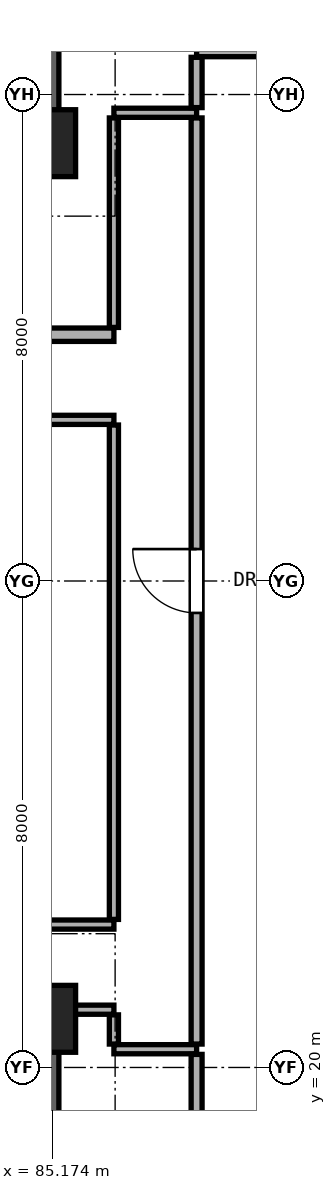
"""IFC4 building model, lengths in metres.
Left out: names, types, materials, properties, quantities, classifications, styles, units other than length and angle.
Written with IfcOpenShell. Run it as: python <this file> out.ifc"""

import sys

from ifc_helpers import new_model, si_unit, direction, frame, frame_2d, origin, origin_2d, place, context, subcontext, project, spatial, rectangle, extrude, element, fill, save


model = new_model("IFC4")
c1 = context("Model", 3, precision=1e-05, world=origin(), true_north=direction((0.0, 1.0)))
c2 = subcontext(c1, "Body", "Model", "MODEL_VIEW")
j1 = project(units=[si_unit("LENGTHUNIT", "METRE"), si_unit("PLANEANGLEUNIT", "RADIAN")], contexts=[c1])
p1 = place(None, origin())
s1 = spatial("IfcSite", under=j1, at=p1, CompositionType="ELEMENT")
p2 = place(p1, origin())
s2 = spatial("IfcBuilding", under=s1, at=p2, CompositionType="ELEMENT")
p3 = place(p2, frame((0.0, 0.0, 137.9)))
s3 = spatial("IfcBuildingStorey", under=s2, at=p3, CompositionType="ELEMENT", Elevation=137.9)
for number, where, z_axis, x_axis in (
    (1, (85.0, 20.8, 0.0), (0.0, 0.0, 1.0), (1.0, 0.0, 0.0)),
    (2, (85.0, 35.2, 0.0), (0.0, 0.0, 1.0), (1.0, 0.0, 0.0)),
):
    element("IfcColumn", number, at=place(p3, frame(where, z_axis=z_axis, x_axis=x_axis)), inside=s3, PredefinedType="COLUMN", context=c2, shape_type="SweptSolid", body=[
        extrude(rectangle(XDim=1.1, YDim=1.1, at=origin_2d()), origin(), (0.0, 0.0, 1.0), 3.3),
    ])
for number, where, z_axis, x_axis in (
    (3, (85.0, 35.2, 0.0), (0.0, 0.0, 1.0), (0.0, 1.0, 0.0)),
    (4, (85.0, 15.2, 0.0), (0.0, 0.0, 1.0), (0.0, 1.0, 0.0)),
):
    element("IfcWall", number, at=place(p3, frame(where, z_axis=z_axis, x_axis=x_axis)), inside=s3, PredefinedType="SHEAR", context=c2, shape_type="SweptSolid", body=[
        extrude(rectangle(XDim=5.6, YDim=0.55, at=frame_2d((2.8, 0.0))), origin(), (0.0, 0.0, 1.0), 3.08),
    ])
p4 = place(p3, frame((86.18, 20.3, 0.0), z_axis=(0.0, 0.0, 1.0), x_axis=(1.0, 0.0, 0.0)))
e5 = element("IfcWall", 5, at=p4, inside=s3, PredefinedType="PARTITIONING", context=c2, shape_type="SweptSolid", body=[
    extrude(rectangle(XDim=1.36, YDim=0.15, at=frame_2d((0.68, 0.0))), origin(), (0.0, 0.0, 1.0), 3.08),
])
p5 = place(p3, frame((85.27, 20.95, 0.0), z_axis=(0.0, 0.0, 1.0), x_axis=(1.0, 0.0, 0.0)))
e6 = element("IfcWall", 6, at=p5, inside=s3, PredefinedType="PARTITIONING", context=c2, shape_type="SweptSolid", body=[
    extrude(rectangle(XDim=0.91, YDim=0.15, at=frame_2d((0.455, 0.0))), origin(), (0.0, 0.0, 1.0), 2.472),
])
p6 = place(p3, frame((66.68, 22.35, 0.0), z_axis=(0.0, 0.0, 1.0), x_axis=(1.0, 0.0, 0.0)))
e7 = element("IfcWall", 7, at=p6, inside=s3, PredefinedType="PARTITIONING", context=c2, shape_type="SweptSolid", body=[
    extrude(rectangle(XDim=19.5, YDim=0.15, at=frame_2d((9.75, 0.0))), origin(), (0.0, 0.0, 1.0), 2.216),
])
p7 = place(p6, frame((7.954, 0.0, 0.0)))
e8 = element("IfcOpeningElement", 8, at=p7, cuts=e7, PredefinedType="OPENING", context=c2, shape_type="SweptSolid", body=[
    extrude(rectangle(XDim=1.05, YDim=2.2, at=frame_2d((0.525, 1.1))), frame((0.0, 0.085, 0.0), z_axis=(0.0, -1.0, 0.0), x_axis=(1.0, 0.0, 0.0)), (0.0, 0.0, 1.0), 0.17),
])
p8 = place(p3, frame((66.68, 30.65, 0.0), z_axis=(0.0, 0.0, 1.0), x_axis=(1.0, 0.0, 0.0)))
e9 = element("IfcWall", 9, at=p8, inside=s3, PredefinedType="PARTITIONING", context=c2, shape_type="SweptSolid", body=[
    extrude(rectangle(XDim=19.5, YDim=0.15, at=frame_2d((9.75, 0.0))), origin(), (0.0, 0.0, 1.0), 2.216),
])
p9 = place(p8, frame((3.745, 0.0, 0.0)))
e10 = element("IfcOpeningElement", 10, at=p9, cuts=e9, PredefinedType="OPENING", context=c2, shape_type="SweptSolid", body=[
    extrude(rectangle(XDim=0.95, YDim=2.15, at=frame_2d((0.475, 1.075))), frame((0.0, 0.085, 0.0), z_axis=(0.0, -1.0, 0.0), x_axis=(1.0, 0.0, 0.0)), (0.0, 0.0, 1.0), 0.17),
])
p10 = place(p8, frame((14.999, 0.0, 0.0)))
e11 = element("IfcOpeningElement", 11, at=p10, cuts=e9, PredefinedType="OPENING", context=c2, shape_type="SweptSolid", body=[
    extrude(rectangle(XDim=1.05, YDim=2.2, at=frame_2d((0.525, 1.1))), frame((0.0, 0.085, 0.0), z_axis=(0.0, -1.0, 0.0), x_axis=(1.0, 0.0, 0.0)), (0.0, 0.0, 1.0), 0.17),
])
p11 = place(p3, frame((71.55, 32.05, 0.0), z_axis=(0.0, 0.0, 1.0), x_axis=(1.0, 0.0, 0.0)))
e12 = element("IfcWall", 12, at=p11, inside=s3, PredefinedType="SOLIDWALL", context=c2, shape_type="SweptSolid", body=[
    extrude(rectangle(XDim=14.63, YDim=0.22, at=frame_2d((7.315, 0.0))), origin(), (0.0, 0.0, 1.0), 2.216),
])
p12 = place(p11, frame((6.065, 0.0, 0.0)))
e13 = element("IfcOpeningElement", 13, at=p12, cuts=e12, PredefinedType="OPENING", context=c2, shape_type="SweptSolid", body=[
    extrude(rectangle(XDim=0.85, YDim=2.01, at=frame_2d((0.425, 1.005))), frame((0.0, 0.12, 0.0), z_axis=(0.0, -1.0, 0.0), x_axis=(1.0, 0.0, 0.0)), (0.0, 0.0, 1.0), 0.24),
])
p13 = place(p11, frame((10.535, 0.0, 0.0)))
e14 = element("IfcOpeningElement", 14, at=p13, cuts=e12, PredefinedType="OPENING", context=c2, shape_type="SweptSolid", body=[
    extrude(rectangle(XDim=0.95, YDim=2.15, at=frame_2d((0.475, 1.075))), frame((0.0, 0.12, 0.0), z_axis=(0.0, -1.0, 0.0), x_axis=(1.0, 0.0, 0.0)), (0.0, 0.0, 1.0), 0.24),
])
p14 = place(p11, frame((0.7, 0.0, 0.0)))
e15 = element("IfcOpeningElement", 15, at=p14, cuts=e12, PredefinedType="OPENING", context=c2, shape_type="SweptSolid", body=[
    extrude(rectangle(XDim=0.85, YDim=2.01, at=frame_2d((0.425, 1.005))), frame((0.0, 0.12, 0.0), z_axis=(0.0, -1.0, 0.0), x_axis=(1.0, 0.0, 0.0)), (0.0, 0.0, 1.0), 0.24),
])
p15 = place(p11, frame((2.55, 0.0, 0.0)))
e16 = element("IfcOpeningElement", 16, at=p15, cuts=e12, PredefinedType="OPENING", context=c2, shape_type="SweptSolid", body=[
    extrude(rectangle(XDim=0.85, YDim=2.01, at=frame_2d((0.425, 1.005))), frame((0.0, 0.12, 0.0), z_axis=(0.0, -1.0, 0.0), x_axis=(1.0, 0.0, 0.0)), (0.0, 0.0, 1.0), 0.24),
])
p16 = place(p3, frame((86.18, 35.7, 0.0), z_axis=(0.0, 0.0, 1.0), x_axis=(1.0, 0.0, 0.0)))
e17 = element("IfcWall", 17, at=p16, inside=s3, PredefinedType="PARTITIONING", context=c2, shape_type="SweptSolid", body=[
    extrude(rectangle(XDim=1.36, YDim=0.15, at=frame_2d((0.68, 0.0))), origin(), (0.0, 0.0, 1.0), 3.08),
])
p17 = place(p3, frame((87.54, 36.712, 0.0), z_axis=(0.0, 0.0, 1.0), x_axis=(1.0, 0.0, 0.0)))
e18 = element("IfcWall", 18, at=p17, inside=s3, PredefinedType="PARTITIONING", context=c2, shape_type="SweptSolid", body=[
    extrude(rectangle(XDim=7.233, YDim=0.18, at=frame_2d((3.616, 0.0))), origin(), (0.0, 0.0, 1.0), 2.523),
])
p18 = place(p17, frame((1.191, 0.0, 0.0)))
e19 = element("IfcOpeningElement", 19, at=p18, cuts=e18, PredefinedType="OPENING", context=c2, shape_type="SweptSolid", body=[
    extrude(rectangle(XDim=0.95, YDim=2.15, at=frame_2d((0.475, 1.075))), frame((0.0, 0.1, 0.0), z_axis=(0.0, -1.0, 0.0), x_axis=(1.0, 0.0, 0.0)), (0.0, 0.0, 1.0), 0.2),
])
p19 = place(p17, frame((5.743, 0.0, 0.0)))
e20 = element("IfcOpeningElement", 20, at=p19, cuts=e18, PredefinedType="OPENING", context=c2, shape_type="SweptSolid", body=[
    extrude(rectangle(XDim=0.9, YDim=2.1, at=frame_2d((0.45, 1.05))), frame((0.0, 0.1, 0.0), z_axis=(0.0, -1.0, 0.0), x_axis=(1.0, 0.0, 0.0)), (0.0, 0.0, 1.0), 0.2),
])
p20 = place(p3, frame((86.18, 20.385, 0.0), z_axis=(0.0, 0.0, 1.0), x_axis=(0.0, 1.0, 0.0)))
e21 = element("IfcWall", 21, at=p20, inside=s3, PredefinedType="PARTITIONING", context=c2, shape_type="SweptSolid", body=[
    extrude(rectangle(XDim=0.48, YDim=0.15, at=frame_2d((0.24, 0.0))), origin(), (0.0, 0.0, 1.0), 2.472),
])
p21 = place(p3, frame((86.18, 22.435, 0.0), z_axis=(0.0, 0.0, 1.0), x_axis=(0.0, 1.0, 0.0)))
e22 = element("IfcWall", 22, at=p21, inside=s3, PredefinedType="PARTITIONING", context=c2, shape_type="SweptSolid", body=[
    extrude(rectangle(XDim=8.13, YDim=0.15, at=frame_2d((4.065, 0.0))), origin(), (0.0, 0.0, 1.0), 2.376),
])
p22 = place(p3, frame((86.18, 32.17, 0.0), z_axis=(0.0, 0.0, 1.0), x_axis=(0.0, 1.0, 0.0)))
e23 = element("IfcWall", 23, at=p22, inside=s3, PredefinedType="PARTITIONING", context=c2, shape_type="SweptSolid", body=[
    extrude(rectangle(XDim=3.445, YDim=0.15, at=frame_2d((1.723, 0.0))), origin(), (0.0, 0.0, 1.0), 2.472),
])
p23 = place(p3, frame((87.54, 16.668, 0.0), z_axis=(0.0, 0.0, 1.0), x_axis=(0.0, 1.0, 0.0)))
e24 = element("IfcWall", 24, at=p23, inside=s3, PredefinedType="PARTITIONING", context=c2, shape_type="SweptSolid", body=[
    extrude(rectangle(XDim=3.547, YDim=0.18, at=frame_2d((1.773, 0.0))), origin(), (0.0, 0.0, 1.0), 2.523),
])
p24 = place(p3, frame((87.54, 20.385, 0.0), z_axis=(0.0, 0.0, 1.0), x_axis=(0.0, 1.0, 0.0)))
e25 = element("IfcWall", 25, at=p24, inside=s3, PredefinedType="PARTITIONING", context=c2, shape_type="SweptSolid", body=[
    extrude(rectangle(XDim=15.23, YDim=0.18, at=frame_2d((7.615, 0.0))), origin(), (0.0, 0.0, 1.0), 2.376),
])
p25 = place(p24, frame((7.09, 0.0, 0.0)))
e26 = element("IfcOpeningElement", 26, at=p25, cuts=e25, PredefinedType="OPENING", context=c2, shape_type="SweptSolid", body=[
    extrude(rectangle(XDim=1.05, YDim=2.2, at=frame_2d((0.525, 1.1))), frame((0.0, 0.1, 0.0), z_axis=(0.0, -1.0, 0.0), x_axis=(1.0, 0.0, 0.0)), (0.0, 0.0, 1.0), 0.2),
])
p26 = place(p3, frame((87.54, 35.785, 0.0), z_axis=(0.0, 0.0, 1.0), x_axis=(0.0, 1.0, 0.0)))
e27 = element("IfcWall", 27, at=p26, inside=s3, PredefinedType="PARTITIONING", context=c2, shape_type="SweptSolid", body=[
    extrude(rectangle(XDim=0.827, YDim=0.18, at=frame_2d((0.414, 0.0))), origin(), (0.0, 0.0, 1.0), 3.08),
])
p27 = place(p25, origin())
e28 = element("IfcDoor", 28, at=p27, inside=s3, OperationType="SINGLE_SWING_RIGHT", PredefinedType="DOOR", context=c2, shape_type="SweptSolid", body=[
    extrude(rectangle(XDim=1.05, YDim=2.2, at=frame_2d((0.525, 1.1))), frame((0.0, 0.025, 0.0), z_axis=(0.0, -1.0, 0.0), x_axis=(1.0, 0.0, 0.0)), (0.0, 0.0, 1.0), 0.05),
])
fill(e26, e28)
save(model, sys.argv[1])
